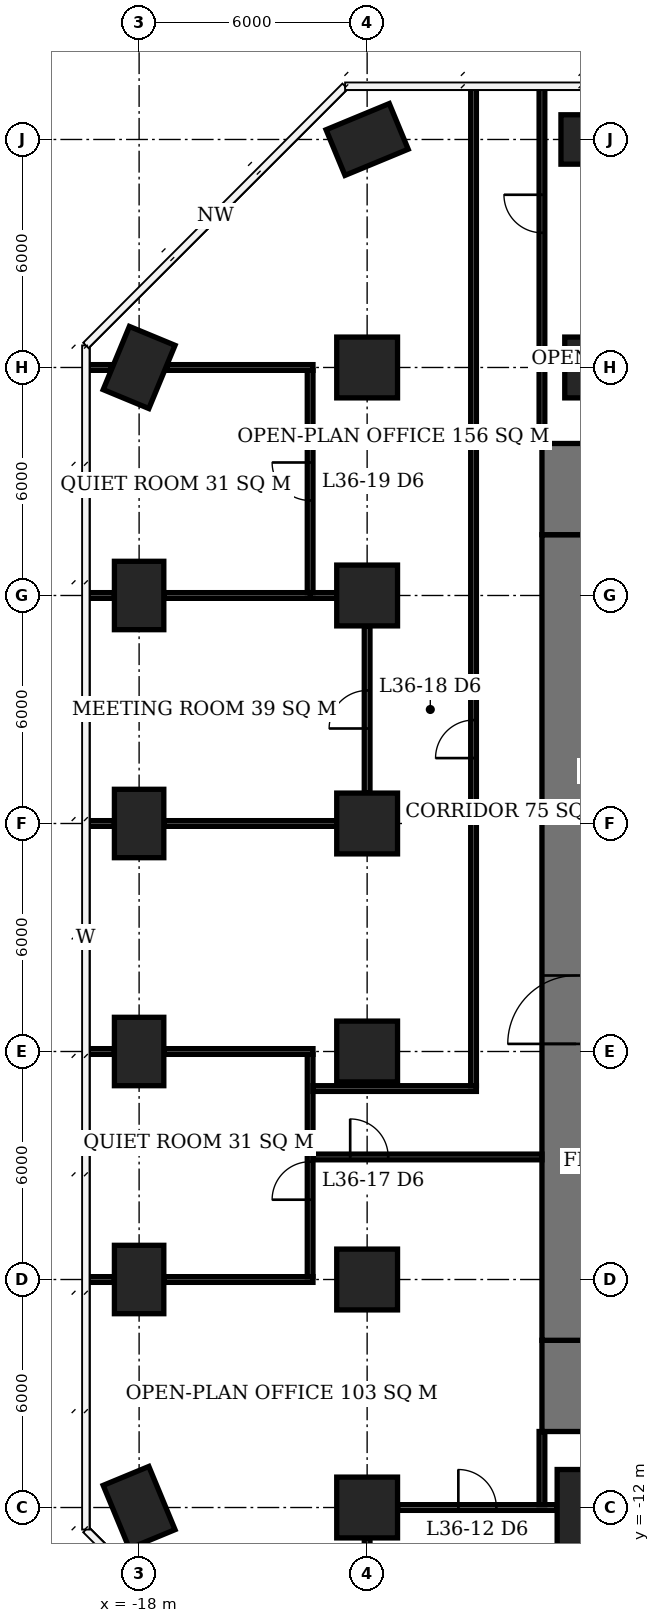
"""IFC4 building model, lengths in metres.
Left out: names, types, materials, properties, quantities, classifications, styles, units other than length and angle.
Written with IfcOpenShell. Run it as: python <this file> out.ifc"""

import sys

from ifc_helpers import new_model, si_unit, direction, frame, frame_2d, origin, origin_2d, place, context, subcontext, project, spatial, rectangle, extrude, element, fill, save


model = new_model("IFC4")
c1 = context("Model", 3, precision=1e-05, world=origin(), true_north=direction((0.0, 1.0)))
c2 = subcontext(c1, "Body", "Model", "MODEL_VIEW")
j1 = project(units=[si_unit("LENGTHUNIT", "METRE"), si_unit("PLANEANGLEUNIT", "RADIAN")], contexts=[c1])
p1 = place(None, origin())
s1 = spatial("IfcSite", under=j1, at=p1, CompositionType="ELEMENT")
p2 = place(p1, origin())
s2 = spatial("IfcBuilding", under=s1, at=p2, CompositionType="ELEMENT")
p3 = place(p2, frame((0.0, 0.0, 148.4)))
s3 = spatial("IfcBuildingStorey", under=s2, at=p3, CompositionType="ELEMENT", Elevation=148.4)
for number, where, z_axis, x_axis in (
    (1, (-18.0, -12.0, 0.0), (0.0, 0.0, 1.0), (-0.383, 0.924, 0.0)),
    (2, (-18.0, -6.0, 0.0), (0.0, 0.0, 1.0), (0.0, 1.0, 0.0)),
    (3, (-18.0, 0.0, 0.0), (0.0, 0.0, 1.0), (0.0, 1.0, 0.0)),
    (4, (-18.0, 6.0, 0.0), (0.0, 0.0, 1.0), (0.0, 1.0, 0.0)),
    (5, (-18.0, 12.0, 0.0), (0.0, 0.0, 1.0), (0.0, 1.0, 0.0)),
    (6, (-18.0, 18.0, 0.0), (0.0, 0.0, 1.0), (0.383, 0.924, 0.0)),
):
    element("IfcColumn", number, at=place(p3, frame(where, z_axis=z_axis, x_axis=x_axis)), inside=s3, PredefinedType="COLUMN", context=c2, shape_type="SweptSolid", body=[
        extrude(rectangle(XDim=1.8, YDim=1.3, at=origin_2d()), origin(), (0.0, 0.0, 1.0), 3.9),
    ])
for number, where, z_axis, x_axis in (
    (7, (-12.0, -12.0, 0.0), (0.0, 0.0, 1.0), (1.0, 0.0, 0.0)),
    (8, (-12.0, -6.0, 0.0), (0.0, 0.0, 1.0), (1.0, 0.0, 0.0)),
    (9, (-12.0, 0.0, 0.0), (0.0, 0.0, 1.0), (1.0, 0.0, 0.0)),
    (10, (-12.0, 6.0, 0.0), (0.0, 0.0, 1.0), (1.0, 0.0, 0.0)),
    (11, (-12.0, 12.0, 0.0), (0.0, 0.0, 1.0), (1.0, 0.0, 0.0)),
    (12, (-12.0, 18.0, 0.0), (0.0, 0.0, 1.0), (1.0, 0.0, 0.0)),
):
    element("IfcColumn", number, at=place(p3, frame(where, z_axis=z_axis, x_axis=x_axis)), inside=s3, PredefinedType="COLUMN", context=c2, shape_type="SweptSolid", body=[
        extrude(rectangle(XDim=1.6, YDim=1.6, at=origin_2d()), origin(), (0.0, 0.0, 1.0), 3.9),
    ])
p4 = place(p3, frame((-12.0, 24.0, 0.0), z_axis=(0.0, 0.0, 1.0), x_axis=(0.923879532511, 0.382683432365, 0.0)))
e13 = element("IfcColumn", 13, at=p4, inside=s3, PredefinedType="COLUMN", context=c2, shape_type="SweptSolid", body=[
    extrude(rectangle(XDim=1.8, YDim=1.3, at=origin_2d()), origin(), (0.0, 0.0, 1.0), 3.9),
])
p5 = place(p3, frame((-6.0, -12.0, 0.0), z_axis=(0.0, 0.0, 1.0), x_axis=(1.0, 0.0, 0.0)))
e14 = element("IfcColumn", 14, at=p5, inside=s3, PredefinedType="COLUMN", context=c2, shape_type="SweptSolid", body=[
    extrude(rectangle(XDim=2.0, YDim=2.0, at=origin_2d()), origin(), (0.0, 0.0, 1.0), 3.9),
])
p6 = place(p3, frame((-6.0, 18.0, 0.0), z_axis=(0.0, 0.0, 1.0), x_axis=(1.0, 0.0, 0.0)))
e15 = element("IfcColumn", 15, at=p6, inside=s3, PredefinedType="COLUMN", context=c2, shape_type="SweptSolid", body=[
    extrude(rectangle(XDim=1.6, YDim=1.6, at=origin_2d()), origin(), (0.0, 0.0, 1.0), 3.9),
])
p7 = place(p3, frame((-6.0, 24.0, 0.0), z_axis=(0.0, 0.0, 1.0), x_axis=(1.0, 0.0, 0.0)))
e16 = element("IfcColumn", 16, at=p7, inside=s3, PredefinedType="COLUMN", context=c2, shape_type="SweptSolid", body=[
    extrude(rectangle(XDim=1.8, YDim=1.3, at=origin_2d()), origin(), (0.0, 0.0, 1.0), 3.9),
])
p8 = place(p3, frame((-6.5, -7.6, 0.0), z_axis=(0.0, 0.0, 1.0), x_axis=(0.0, 1.0, 0.0)))
e17 = element("IfcWall", 17, at=p8, inside=s3, PredefinedType="SHEAR", context=c2, shape_type="SweptSolid", body=[
    extrude(rectangle(XDim=21.2, YDim=1.8, at=frame_2d((10.6, 0.0))), origin(), (0.0, 0.0, 1.0), 3.9),
])
p9 = place(p8, frame((7.8, 0.0, 0.0)))
e18 = element("IfcOpeningElement", 18, at=p9, cuts=e17, PredefinedType="OPENING", context=c2, shape_type="SweptSolid", body=[
    extrude(rectangle(XDim=1.8, YDim=2.4, at=frame_2d((0.9, 1.2))), frame((0.0, 0.91, 0.0), z_axis=(0.0, -1.0, 0.0), x_axis=(1.0, 0.0, 0.0)), (0.0, 0.0, 1.0), 1.82),
])
for number, where, z_axis, x_axis in (
    (19, (-6.5, -10.0, 0.0), (0.0, 0.0, 1.0), (0.0, 1.0, 0.0)),
    (20, (-6.5, 13.6, 0.0), (0.0, 0.0, 1.0), (0.0, 1.0, 0.0)),
):
    element("IfcWall", number, at=place(p3, frame(where, z_axis=z_axis, x_axis=x_axis)), inside=s3, PredefinedType="SHEAR", context=c2, shape_type="SweptSolid", body=[
        extrude(rectangle(XDim=2.4, YDim=1.8, at=frame_2d((1.2, 0.0))), origin(), (0.0, 0.0, 1.0), 3.9),
    ])
p10 = place(p3, frame((-11.2, -12.0, 0.0), z_axis=(0.0, 0.0, 1.0), x_axis=(1.0, 0.0, 0.0)))
e21 = element("IfcWall", 21, at=p10, inside=s3, PredefinedType="PARTITIONING", context=c2, shape_type="SweptSolid", body=[
    extrude(rectangle(XDim=4.2, YDim=0.15, at=frame_2d((2.1, 0.0))), origin(), (0.0, 0.0, 1.0), 3.65),
])
p11 = place(p10, frame((1.6, 0.0, 0.0)))
e22 = element("IfcOpeningElement", 22, at=p11, cuts=e21, PredefinedType="OPENING", context=c2, shape_type="SweptSolid", body=[
    extrude(rectangle(XDim=1.0, YDim=2.1, at=frame_2d((0.5, 1.05))), frame((0.0, 0.085, 0.0), z_axis=(0.0, -1.0, 0.0), x_axis=(1.0, 0.0, 0.0)), (0.0, 0.0, 1.0), 0.17),
])
p12 = place(p3, frame((-19.4, -6.0, 0.0), z_axis=(0.0, 0.0, 1.0), x_axis=(1.0, 0.0, 0.0)))
e23 = element("IfcWall", 23, at=p12, inside=s3, PredefinedType="PARTITIONING", context=c2, shape_type="SweptSolid", body=[
    extrude(rectangle(XDim=0.75, YDim=0.15, at=frame_2d((0.375, 0.0))), origin(), (0.0, 0.0, 1.0), 3.65),
])
p13 = place(p3, frame((-17.35, -6.0, 0.0), z_axis=(0.0, 0.0, 1.0), x_axis=(1.0, 0.0, 0.0)))
e24 = element("IfcWall", 24, at=p13, inside=s3, PredefinedType="PARTITIONING", context=c2, shape_type="SweptSolid", body=[
    extrude(rectangle(XDim=3.925, YDim=0.15, at=frame_2d((1.962, 0.0))), origin(), (0.0, 0.0, 1.0), 3.65),
])
p14 = place(p3, frame((-19.35, 0.0, 0.0), z_axis=(0.0, 0.0, 1.0), x_axis=(1.0, 0.0, 0.0)))
e25 = element("IfcWall", 25, at=p14, inside=s3, PredefinedType="PARTITIONING", context=c2, shape_type="SweptSolid", body=[
    extrude(rectangle(XDim=0.7, YDim=0.15, at=frame_2d((0.35, 0.0))), origin(), (0.0, 0.0, 1.0), 3.65),
])
p15 = place(p3, frame((-17.35, 0.0, 0.0), z_axis=(0.0, 0.0, 1.0), x_axis=(1.0, 0.0, 0.0)))
e26 = element("IfcWall", 26, at=p15, inside=s3, PredefinedType="PARTITIONING", context=c2, shape_type="SweptSolid", body=[
    extrude(rectangle(XDim=3.925, YDim=0.15, at=frame_2d((1.962, 0.0))), origin(), (0.0, 0.0, 1.0), 3.65),
])
p16 = place(p3, frame((-19.35, 6.0, 0.0), z_axis=(0.0, 0.0, 1.0), x_axis=(1.0, 0.0, 0.0)))
e27 = element("IfcWall", 27, at=p16, inside=s3, PredefinedType="PARTITIONING", context=c2, shape_type="SweptSolid", body=[
    extrude(rectangle(XDim=0.7, YDim=0.15, at=frame_2d((0.35, 0.0))), origin(), (0.0, 0.0, 1.0), 3.65),
])
p17 = place(p3, frame((-17.35, 6.0, 0.0), z_axis=(0.0, 0.0, 1.0), x_axis=(1.0, 0.0, 0.0)))
e28 = element("IfcWall", 28, at=p17, inside=s3, PredefinedType="PARTITIONING", context=c2, shape_type="SweptSolid", body=[
    extrude(rectangle(XDim=4.55, YDim=0.15, at=frame_2d((2.275, 0.0))), origin(), (0.0, 0.0, 1.0), 3.65),
])
p18 = place(p3, frame((-19.4, 12.0, 0.0), z_axis=(0.0, 0.0, 1.0), x_axis=(1.0, 0.0, 0.0)))
e29 = element("IfcWall", 29, at=p18, inside=s3, PredefinedType="PARTITIONING", context=c2, shape_type="SweptSolid", body=[
    extrude(rectangle(XDim=0.75, YDim=0.15, at=frame_2d((0.375, 0.0))), origin(), (0.0, 0.0, 1.0), 3.65),
])
p19 = place(p3, frame((-17.35, 12.0, 0.0), z_axis=(0.0, 0.0, 1.0), x_axis=(1.0, 0.0, 0.0)))
e30 = element("IfcWall", 30, at=p19, inside=s3, PredefinedType="PARTITIONING", context=c2, shape_type="SweptSolid", body=[
    extrude(rectangle(XDim=3.925, YDim=0.15, at=frame_2d((1.962, 0.0))), origin(), (0.0, 0.0, 1.0), 3.65),
])
p20 = place(p3, frame((-13.5, 12.0, 0.0), z_axis=(0.0, 0.0, 1.0), x_axis=(1.0, 0.0, 0.0)))
e31 = element("IfcWall", 31, at=p20, inside=s3, PredefinedType="PARTITIONING", context=c2, shape_type="SweptSolid", body=[
    extrude(rectangle(XDim=0.7, YDim=0.15, at=frame_2d((0.35, 0.0))), origin(), (0.0, 0.0, 1.0), 3.65),
])
p21 = place(p3, frame((-19.4, 18.0, 0.0), z_axis=(0.0, 0.0, 1.0), x_axis=(1.0, 0.0, 0.0)))
e32 = element("IfcWall", 32, at=p21, inside=s3, PredefinedType="PARTITIONING", context=c2, shape_type="SweptSolid", body=[
    extrude(rectangle(XDim=0.665, YDim=0.15, at=frame_2d((0.333, 0.0))), origin(), (0.0, 0.0, 1.0), 3.65),
])
p22 = place(p3, frame((-17.265, 18.0, 0.0), z_axis=(0.0, 0.0, 1.0), x_axis=(1.0, 0.0, 0.0)))
e33 = element("IfcWall", 33, at=p22, inside=s3, PredefinedType="PARTITIONING", context=c2, shape_type="SweptSolid", body=[
    extrude(rectangle(XDim=3.84, YDim=0.15, at=frame_2d((1.92, 0.0))), origin(), (0.0, 0.0, 1.0), 3.65),
])
p23 = place(p3, frame((-13.5, -5.925, 0.0), z_axis=(0.0, 0.0, 1.0), x_axis=(0.0, 1.0, 0.0)))
e34 = element("IfcWall", 34, at=p23, inside=s3, PredefinedType="PARTITIONING", context=c2, shape_type="SweptSolid", body=[
    extrude(rectangle(XDim=5.85, YDim=0.15, at=frame_2d((2.925, 0.0))), origin(), (0.0, 0.0, 1.0), 3.65),
])
p24 = place(p23, frame((2.025, 0.0, 0.0)))
e35 = element("IfcOpeningElement", 35, at=p24, cuts=e34, PredefinedType="OPENING", context=c2, shape_type="SweptSolid", body=[
    extrude(rectangle(XDim=1.0, YDim=2.1, at=frame_2d((0.5, 1.05))), frame((0.0, 0.085, 0.0), z_axis=(0.0, -1.0, 0.0), x_axis=(1.0, 0.0, 0.0)), (0.0, 0.0, 1.0), 0.17),
])
p25 = place(p3, frame((-13.5, 12.075, 0.0), z_axis=(0.0, 0.0, 1.0), x_axis=(0.0, 1.0, 0.0)))
e36 = element("IfcWall", 36, at=p25, inside=s3, PredefinedType="PARTITIONING", context=c2, shape_type="SweptSolid", body=[
    extrude(rectangle(XDim=5.85, YDim=0.15, at=frame_2d((2.925, 0.0))), origin(), (0.0, 0.0, 1.0), 3.65),
])
p26 = place(p25, frame((2.425, 0.0, 0.0)))
e37 = element("IfcOpeningElement", 37, at=p26, cuts=e36, PredefinedType="OPENING", context=c2, shape_type="SweptSolid", body=[
    extrude(rectangle(XDim=1.0, YDim=2.1, at=frame_2d((0.5, 1.05))), frame((0.0, 0.085, 0.0), z_axis=(0.0, -1.0, 0.0), x_axis=(1.0, 0.0, 0.0)), (0.0, 0.0, 1.0), 0.17),
])
p27 = place(p3, frame((-12.0, -16.31, 0.0), z_axis=(0.0, 0.0, 1.0), x_axis=(0.0, 1.0, 0.0)))
e38 = element("IfcWall", 38, at=p27, inside=s3, PredefinedType="PARTITIONING", context=c2, shape_type="SweptSolid", body=[
    extrude(rectangle(XDim=3.51, YDim=0.15, at=frame_2d((1.755, 0.0))), origin(), (0.0, 0.0, 1.0), 2.65),
])
p28 = place(p3, frame((-12.0, 6.8, 0.0), z_axis=(0.0, 0.0, 1.0), x_axis=(0.0, 1.0, 0.0)))
e39 = element("IfcWall", 39, at=p28, inside=s3, PredefinedType="PARTITIONING", context=c2, shape_type="SweptSolid", body=[
    extrude(rectangle(XDim=4.4, YDim=0.15, at=frame_2d((2.2, 0.0))), origin(), (0.0, 0.0, 1.0), 3.65),
])
p29 = place(p28, frame((1.7, 0.0, 0.0)))
e40 = element("IfcOpeningElement", 40, at=p29, cuts=e39, PredefinedType="OPENING", context=c2, shape_type="SweptSolid", body=[
    extrude(rectangle(XDim=1.0, YDim=2.1, at=frame_2d((0.5, 1.05))), frame((0.0, 0.085, 0.0), z_axis=(0.0, -1.0, 0.0), x_axis=(1.0, 0.0, 0.0)), (0.0, 0.0, 1.0), 0.17),
])
p30 = place(p3, frame((-13.425, -2.775, 0.0), z_axis=(0.0, 0.0, 1.0), x_axis=(1.0, 0.0, 0.0)))
e41 = element("IfcWall", 41, at=p30, inside=s3, PredefinedType="PARTITIONING", context=c2, shape_type="SweptSolid", body=[
    extrude(rectangle(XDim=6.025, YDim=0.15, at=frame_2d((3.013, 0.0))), origin(), (0.0, 0.0, 1.0), 3.65),
])
p31 = place(p30, frame((0.979, 0.0, 0.0)))
e42 = element("IfcOpeningElement", 42, at=p31, cuts=e41, PredefinedType="OPENING", context=c2, shape_type="SweptSolid", body=[
    extrude(rectangle(XDim=1.0, YDim=2.1, at=frame_2d((0.5, 1.05))), frame((0.0, 0.085, 0.0), z_axis=(0.0, -1.0, 0.0), x_axis=(1.0, 0.0, 0.0)), (0.0, 0.0, 1.0), 0.17),
])
p32 = place(p3, frame((-13.425, -0.975, 0.0), z_axis=(0.0, 0.0, 1.0), x_axis=(1.0, 0.0, 0.0)))
e43 = element("IfcWall", 43, at=p32, inside=s3, PredefinedType="PARTITIONING", context=c2, shape_type="SweptSolid", body=[
    extrude(rectangle(XDim=4.3, YDim=0.15, at=frame_2d((2.15, 0.0))), origin(), (0.0, 0.0, 1.0), 3.65),
])
p33 = place(p3, frame((-9.2, -0.9, 0.0), z_axis=(0.0, 0.0, 1.0), x_axis=(0.0, 1.0, 0.0)))
e44 = element("IfcWall", 44, at=p33, inside=s3, PredefinedType="PARTITIONING", context=c2, shape_type="SweptSolid", body=[
    extrude(rectangle(XDim=26.3, YDim=0.15, at=frame_2d((13.15, 0.0))), origin(), (0.0, 0.0, 1.0), 3.65),
])
p34 = place(p33, frame((8.621, 0.0, 0.0)))
e45 = element("IfcOpeningElement", 45, at=p34, cuts=e44, PredefinedType="OPENING", context=c2, shape_type="SweptSolid", body=[
    extrude(rectangle(XDim=1.0, YDim=2.1, at=frame_2d((0.5, 1.05))), frame((0.0, 0.085, 0.0), z_axis=(0.0, -1.0, 0.0), x_axis=(1.0, 0.0, 0.0)), (0.0, 0.0, 1.0), 0.17),
])
p35 = place(p3, frame((-7.4, -11.925, 0.0), z_axis=(0.0, 0.0, 1.0), x_axis=(0.0, 1.0, 0.0)))
e46 = element("IfcWall", 46, at=p35, inside=s3, PredefinedType="PARTITIONING", context=c2, shape_type="SweptSolid", body=[
    extrude(rectangle(XDim=1.925, YDim=0.15, at=frame_2d((0.962, 0.0))), origin(), (0.0, 0.0, 1.0), 3.65),
])
p36 = place(p3, frame((-7.4, 16.0, 0.0), z_axis=(0.0, 0.0, 1.0), x_axis=(0.0, 1.0, 0.0)))
e47 = element("IfcWall", 47, at=p36, inside=s3, PredefinedType="PARTITIONING", context=c2, shape_type="SweptSolid", body=[
    extrude(rectangle(XDim=9.4, YDim=0.15, at=frame_2d((4.7, 0.0))), origin(), (0.0, 0.0, 1.0), 3.65),
])
p37 = place(p36, frame((5.545, 0.0, 0.0)))
e48 = element("IfcOpeningElement", 48, at=p37, cuts=e47, PredefinedType="OPENING", context=c2, shape_type="SweptSolid", body=[
    extrude(rectangle(XDim=1.0, YDim=2.1, at=frame_2d((0.5, 1.05))), frame((0.0, 0.085, 0.0), z_axis=(0.0, -1.0, 0.0), x_axis=(1.0, 0.0, 0.0)), (0.0, 0.0, 1.0), 0.17),
])
p38 = place(p9, origin())
e49 = element("IfcDoor", 49, at=p38, inside=s3, OperationType="DOUBLE_DOOR_SINGLE_SWING", PredefinedType="DOOR", context=c2, shape_type="SweptSolid", body=[
    extrude(rectangle(XDim=1.8, YDim=2.4, at=frame_2d((0.9, 1.2))), frame((0.0, 0.025, 0.0), z_axis=(0.0, -1.0, 0.0), x_axis=(1.0, 0.0, 0.0)), (0.0, 0.0, 1.0), 0.05),
])
fill(e18, e49)
p39 = place(p11, origin())
e50 = element("IfcDoor", 50, at=p39, inside=s3, OperationType="SINGLE_SWING_LEFT", PredefinedType="DOOR", context=c2, shape_type="SweptSolid", body=[
    extrude(rectangle(XDim=1.0, YDim=2.1, at=frame_2d((0.5, 1.05))), frame((0.0, 0.025, 0.0), z_axis=(0.0, -1.0, 0.0), x_axis=(1.0, 0.0, 0.0)), (0.0, 0.0, 1.0), 0.05),
])
fill(e22, e50)
p40 = place(p24, origin())
e51 = element("IfcDoor", 51, at=p40, inside=s3, OperationType="SINGLE_SWING_LEFT", PredefinedType="DOOR", context=c2, shape_type="SweptSolid", body=[
    extrude(rectangle(XDim=1.0, YDim=2.1, at=frame_2d((0.5, 1.05))), frame((0.0, 0.025, 0.0), z_axis=(0.0, -1.0, 0.0), x_axis=(1.0, 0.0, 0.0)), (0.0, 0.0, 1.0), 0.05),
])
fill(e35, e51)
p41 = place(p29, origin())
e52 = element("IfcDoor", 52, at=p41, inside=s3, OperationType="SINGLE_SWING_LEFT", PredefinedType="DOOR", context=c2, shape_type="SweptSolid", body=[
    extrude(rectangle(XDim=1.0, YDim=2.1, at=frame_2d((0.5, 1.05))), frame((0.0, 0.025, 0.0), z_axis=(0.0, -1.0, 0.0), x_axis=(1.0, 0.0, 0.0)), (0.0, 0.0, 1.0), 0.05),
])
fill(e40, e52)
p42 = place(p26, origin())
e53 = element("IfcDoor", 53, at=p42, inside=s3, OperationType="SINGLE_SWING_RIGHT", PredefinedType="DOOR", context=c2, shape_type="SweptSolid", body=[
    extrude(rectangle(XDim=1.0, YDim=2.1, at=frame_2d((0.5, 1.05))), frame((0.0, 0.025, 0.0), z_axis=(0.0, -1.0, 0.0), x_axis=(1.0, 0.0, 0.0)), (0.0, 0.0, 1.0), 0.05),
])
fill(e37, e53)
p43 = place(p34, origin())
e54 = element("IfcDoor", 54, at=p43, inside=s3, OperationType="SINGLE_SWING_LEFT", PredefinedType="DOOR", context=c2, shape_type="SweptSolid", body=[
    extrude(rectangle(XDim=1.0, YDim=2.1, at=frame_2d((0.5, 1.05))), frame((0.0, 0.025, 0.0), z_axis=(0.0, -1.0, 0.0), x_axis=(1.0, 0.0, 0.0)), (0.0, 0.0, 1.0), 0.05),
])
fill(e45, e54)
p44 = place(p37, origin())
e55 = element("IfcDoor", 55, at=p44, inside=s3, OperationType="SINGLE_SWING_RIGHT", PredefinedType="DOOR", context=c2, shape_type="SweptSolid", body=[
    extrude(rectangle(XDim=1.0, YDim=2.1, at=frame_2d((0.5, 1.05))), frame((0.0, 0.025, 0.0), z_axis=(0.0, -1.0, 0.0), x_axis=(1.0, 0.0, 0.0)), (0.0, 0.0, 1.0), 0.05),
])
fill(e48, e55)
p45 = place(p31, origin())
e56 = element("IfcDoor", 56, at=p45, inside=s3, OperationType="SINGLE_SWING_LEFT", PredefinedType="DOOR", context=c2, shape_type="SweptSolid", body=[
    extrude(rectangle(XDim=1.0, YDim=2.1, at=frame_2d((0.5, 1.05))), frame((0.0, 0.025, 0.0), z_axis=(0.0, -1.0, 0.0), x_axis=(1.0, 0.0, 0.0)), (0.0, 0.0, 1.0), 0.05),
])
fill(e42, e56)
save(model, sys.argv[1])
